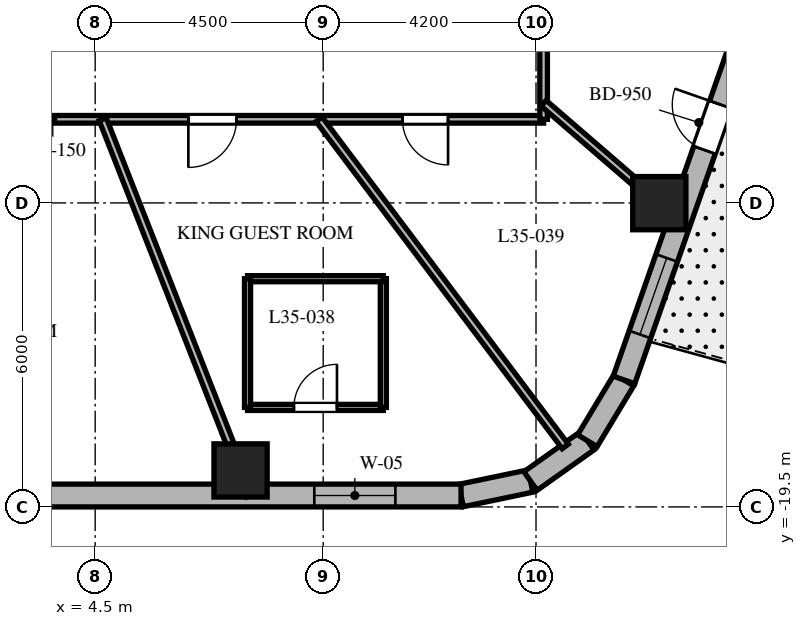
"""IFC4 building model, lengths in metres.
Left out: names, types, materials, properties, quantities, classifications, styles, units other than length and angle.
Written with IfcOpenShell. Run it as: python <this file> out.ifc"""

import sys

from ifc_helpers import new_model, si_unit, direction, frame, frame_2d, origin, origin_2d, place, context, subcontext, project, spatial, rectangle, extrude, element, fill, save


model = new_model("IFC4")
c1 = context("Model", 3, precision=1e-05, world=origin(), true_north=direction((0.0, 1.0)))
c2 = subcontext(c1, "Body", "Model", "MODEL_VIEW")
j1 = project(units=[si_unit("LENGTHUNIT", "METRE"), si_unit("PLANEANGLEUNIT", "RADIAN")], contexts=[c1])
p1 = place(None, origin())
s1 = spatial("IfcSite", under=j1, at=p1, CompositionType="ELEMENT")
p2 = place(p1, origin())
s2 = spatial("IfcBuilding", under=s1, at=p2, CompositionType="ELEMENT")
p3 = place(p2, frame((0.0, 0.0, 144.3)))
s3 = spatial("IfcBuildingStorey", under=s2, at=p3, CompositionType="ELEMENT", Elevation=144.3)
for number, where, z_axis, x_axis in (
    (1, (7.369, -18.78, 0.0), (0.0, 0.0, 1.0), (1.0, 0.0, 0.0)),
    (2, (15.633, -13.505, 0.0), (0.0, 0.0, 1.0), (1.0, 0.0, 0.0)),
):
    element("IfcColumn", number, at=place(p3, frame(where, z_axis=z_axis, x_axis=x_axis)), inside=s3, PredefinedType="COLUMN", context=c2, shape_type="SweptSolid", body=[
        extrude(rectangle(XDim=1.05, YDim=1.05, at=origin_2d()), origin(), (0.0, 0.0, 1.0), 3.7),
    ])
p4 = place(p3, frame((11.72, -19.275, 0.0), z_axis=(0.0, 0.0, 1.0), x_axis=(0.97893106758, 0.204191001093, 0.0)))
e3 = element("IfcWall", 3, at=p4, inside=s3, PredefinedType="SOLIDWALL", context=c2, shape_type="SweptSolid", body=[
    extrude(rectangle(XDim=1.4, YDim=0.45, at=frame_2d((0.7, 0.0))), origin(), (0.0, 0.0, 1.0), 3.4),
])
p5 = place(p3, frame((13.091, -18.989, 0.0), z_axis=(0.0, 0.0, 1.0), x_axis=(0.815574637848, 0.578651890258, 0.0)))
e4 = element("IfcWall", 4, at=p5, inside=s3, PredefinedType="SOLIDWALL", context=c2, shape_type="SweptSolid", body=[
    extrude(rectangle(XDim=1.377, YDim=0.45, at=frame_2d((0.688, 0.0))), origin(), (0.0, 0.0, 1.0), 3.4),
])
p6 = place(p3, frame((14.214, -18.192, 0.0), z_axis=(0.0, 0.0, 1.0), x_axis=(0.516340945502, 0.856383108193, 0.0)))
e5 = element("IfcWall", 5, at=p6, inside=s3, PredefinedType="SOLIDWALL", context=c2, shape_type="SweptSolid", body=[
    extrude(rectangle(XDim=1.4, YDim=0.45, at=frame_2d((0.7, 0.0))), origin(), (0.0, 0.0, 1.0), 3.4),
])
p7 = place(p3, frame((-10.108, -19.275, 0.0), z_axis=(0.0, 0.0, 1.0), x_axis=(1.0, 0.0, 0.0)))
e6 = element("IfcWall", 6, at=p7, inside=s3, PredefinedType="SOLIDWALL", context=c2, shape_type="SweptSolid", body=[
    extrude(rectangle(XDim=21.829, YDim=0.45, at=frame_2d((10.915, 0.0))), origin(), (0.0, 0.0, 1.0), 3.4),
])
p8 = place(p7, frame((1.297, 0.0, 0.8)))
e7 = element("IfcOpeningElement", 7, at=p8, cuts=e6, PredefinedType="OPENING", context=c2, shape_type="SweptSolid", body=[
    extrude(rectangle(XDim=1.6, YDim=1.75, at=frame_2d((0.8, 0.875))), frame((0.0, 0.235, 0.0), z_axis=(0.0, -1.0, 0.0), x_axis=(1.0, 0.0, 0.0)), (0.0, 0.0, 1.0), 0.47),
])
p9 = place(p7, frame((10.115, 0.0, 0.8)))
e8 = element("IfcOpeningElement", 8, at=p9, cuts=e6, PredefinedType="OPENING", context=c2, shape_type="SweptSolid", body=[
    extrude(rectangle(XDim=1.6, YDim=1.75, at=frame_2d((0.8, 0.875))), frame((0.0, 0.235, 0.0), z_axis=(0.0, -1.0, 0.0), x_axis=(1.0, 0.0, 0.0)), (0.0, 0.0, 1.0), 0.47),
])
p10 = place(p7, frame((18.933, 0.0, 0.8)))
e9 = element("IfcOpeningElement", 9, at=p10, cuts=e6, PredefinedType="OPENING", context=c2, shape_type="SweptSolid", body=[
    extrude(rectangle(XDim=1.6, YDim=1.75, at=frame_2d((0.8, 0.875))), frame((0.0, 0.235, 0.0), z_axis=(0.0, -1.0, 0.0), x_axis=(1.0, 0.0, 0.0)), (0.0, 0.0, 1.0), 0.47),
])
p11 = place(p3, frame((14.937, -16.993, 0.0), z_axis=(0.0, 0.0, 1.0), x_axis=(0.330431575061, 0.943829949834, 0.0)))
e10 = element("IfcWall", 10, at=p11, inside=s3, PredefinedType="SOLIDWALL", context=c2, shape_type="SweptSolid", body=[
    extrude(rectangle(XDim=17.689, YDim=0.45, at=frame_2d((8.844, 0.0))), origin(), (0.0, 0.0, 1.0), 3.4),
])
p12 = place(p11, frame((4.807, 0.0, 0.0)))
e11 = element("IfcOpeningElement", 11, at=p12, cuts=e10, PredefinedType="OPENING", context=c2, shape_type="SweptSolid", body=[
    extrude(rectangle(XDim=0.95, YDim=2.15, at=frame_2d((0.475, 1.075))), frame((0.0, 0.235, 0.0), z_axis=(0.0, -1.0, 0.0), x_axis=(1.0, 0.0, 0.0)), (0.0, 0.0, 1.0), 0.47),
])
p13 = place(p11, frame((0.95, 0.0, 0.8)))
e12 = element("IfcOpeningElement", 12, at=p13, cuts=e10, PredefinedType="OPENING", context=c2, shape_type="SweptSolid", body=[
    extrude(rectangle(XDim=1.6, YDim=1.75, at=frame_2d((0.8, 0.875))), frame((0.0, 0.235, 0.0), z_axis=(0.0, -1.0, 0.0), x_axis=(1.0, 0.0, 0.0)), (0.0, 0.0, 1.0), 0.47),
])
p14 = place(p11, frame((7.99, 0.0, 0.8)))
e13 = element("IfcOpeningElement", 13, at=p14, cuts=e10, PredefinedType="OPENING", context=c2, shape_type="SweptSolid", body=[
    extrude(rectangle(XDim=1.6, YDim=1.75, at=frame_2d((0.8, 0.875))), frame((0.0, 0.235, 0.0), z_axis=(0.0, -1.0, 0.0), x_axis=(1.0, 0.0, 0.0)), (0.0, 0.0, 1.0), 0.47),
])
p15 = place(p11, frame((15.084, 0.0, 0.8)))
e14 = element("IfcOpeningElement", 14, at=p15, cuts=e10, PredefinedType="OPENING", context=c2, shape_type="SweptSolid", body=[
    extrude(rectangle(XDim=1.6, YDim=1.75, at=frame_2d((0.8, 0.875))), frame((0.0, 0.235, 0.0), z_axis=(0.0, -1.0, 0.0), x_axis=(1.0, 0.0, 0.0)), (0.0, 0.0, 1.0), 0.47),
])
p16 = place(p3, frame((13.35, -11.85, 0.0), z_axis=(0.0, 0.0, 1.0), x_axis=(-1.0, 0.0, 0.0)))
e15 = element("IfcWall", 15, at=p16, inside=s3, PredefinedType="PARTITIONING", context=c2, shape_type="SweptSolid", body=[
    extrude(rectangle(XDim=26.7, YDim=0.15, at=frame_2d((13.35, 0.0))), origin(), (0.0, 0.0, 1.0), 2.84),
])
p17 = place(p16, frame((22.7, 0.0, 0.0)))
e16 = element("IfcOpeningElement", 16, at=p17, cuts=e15, PredefinedType="OPENING", context=c2, shape_type="SweptSolid", body=[
    extrude(rectangle(XDim=0.9, YDim=2.03, at=frame_2d((0.45, 1.015))), frame((0.0, 0.085, 0.0), z_axis=(0.0, -1.0, 0.0), x_axis=(1.0, 0.0, 0.0)), (0.0, 0.0, 1.0), 0.17),
])
p18 = place(p16, frame((18.523, 0.0, 0.0)))
e17 = element("IfcOpeningElement", 17, at=p18, cuts=e15, PredefinedType="OPENING", context=c2, shape_type="SweptSolid", body=[
    extrude(rectangle(XDim=0.95, YDim=2.03, at=frame_2d((0.475, 1.015))), frame((0.0, 0.085, 0.0), z_axis=(0.0, -1.0, 0.0), x_axis=(1.0, 0.0, 0.0)), (0.0, 0.0, 1.0), 0.17),
])
p19 = place(p16, frame((12.362, 0.0, 0.0)))
e18 = element("IfcOpeningElement", 18, at=p19, cuts=e15, PredefinedType="OPENING", context=c2, shape_type="SweptSolid", body=[
    extrude(rectangle(XDim=0.95, YDim=2.03, at=frame_2d((0.475, 1.015))), frame((0.0, 0.085, 0.0), z_axis=(0.0, -1.0, 0.0), x_axis=(1.0, 0.0, 0.0)), (0.0, 0.0, 1.0), 0.17),
])
p20 = place(p16, frame((6.061, 0.0, 0.0)))
e19 = element("IfcOpeningElement", 19, at=p20, cuts=e15, PredefinedType="OPENING", context=c2, shape_type="SweptSolid", body=[
    extrude(rectangle(XDim=0.95, YDim=2.03, at=frame_2d((0.475, 1.015))), frame((0.0, 0.085, 0.0), z_axis=(0.0, -1.0, 0.0), x_axis=(1.0, 0.0, 0.0)), (0.0, 0.0, 1.0), 0.17),
])
p21 = place(p16, frame((1.886, 0.0, 0.0)))
e20 = element("IfcOpeningElement", 20, at=p21, cuts=e15, PredefinedType="OPENING", context=c2, shape_type="SweptSolid", body=[
    extrude(rectangle(XDim=0.9, YDim=2.03, at=frame_2d((0.45, 1.015))), frame((0.0, 0.085, 0.0), z_axis=(0.0, -1.0, 0.0), x_axis=(1.0, 0.0, 0.0)), (0.0, 0.0, 1.0), 0.17),
])
p22 = place(p3, frame((13.35, 11.85, 0.0), z_axis=(0.0, 0.0, 1.0), x_axis=(0.0, -1.0, 0.0)))
e21 = element("IfcWall", 21, at=p22, inside=s3, PredefinedType="PARTITIONING", context=c2, shape_type="SweptSolid", body=[
    extrude(rectangle(XDim=23.7, YDim=0.15, at=frame_2d((11.85, 0.0))), origin(), (0.0, 0.0, 1.0), 2.84),
])
p23 = place(p22, frame((9.27, 0.0, 0.0)))
e22 = element("IfcOpeningElement", 22, at=p23, cuts=e21, PredefinedType="OPENING", context=c2, shape_type="SweptSolid", body=[
    extrude(rectangle(XDim=0.9, YDim=2.03, at=frame_2d((0.45, 1.015))), frame((0.0, 0.085, 0.0), z_axis=(0.0, -1.0, 0.0), x_axis=(1.0, 0.0, 0.0)), (0.0, 0.0, 1.0), 0.17),
])
p24 = place(p22, frame((5.393, 0.0, 0.0)))
e23 = element("IfcOpeningElement", 23, at=p24, cuts=e21, PredefinedType="OPENING", context=c2, shape_type="SweptSolid", body=[
    extrude(rectangle(XDim=0.9, YDim=2.03, at=frame_2d((0.45, 1.015))), frame((0.0, 0.085, 0.0), z_axis=(0.0, -1.0, 0.0), x_axis=(1.0, 0.0, 0.0)), (0.0, 0.0, 1.0), 0.17),
])
p25 = place(p22, frame((1.439, 0.0, 0.0)))
e24 = element("IfcOpeningElement", 24, at=p25, cuts=e21, PredefinedType="OPENING", context=c2, shape_type="SweptSolid", body=[
    extrude(rectangle(XDim=0.9, YDim=2.03, at=frame_2d((0.45, 1.015))), frame((0.0, 0.085, 0.0), z_axis=(0.0, -1.0, 0.0), x_axis=(1.0, 0.0, 0.0)), (0.0, 0.0, 1.0), 0.17),
])
p26 = place(p22, frame((18.389, 0.0, 0.0)))
e25 = element("IfcOpeningElement", 25, at=p26, cuts=e21, PredefinedType="OPENING", context=c2, shape_type="SweptSolid", body=[
    extrude(rectangle(XDim=0.95, YDim=2.03, at=frame_2d((0.475, 1.015))), frame((0.0, 0.085, 0.0), z_axis=(0.0, -1.0, 0.0), x_axis=(1.0, 0.0, 0.0)), (0.0, 0.0, 1.0), 0.17),
])
p27 = place(p22, frame((12.315, 0.0, 0.0)))
e26 = element("IfcOpeningElement", 26, at=p27, cuts=e21, PredefinedType="OPENING", context=c2, shape_type="SweptSolid", body=[
    extrude(rectangle(XDim=0.9, YDim=2.03, at=frame_2d((0.45, 1.015))), frame((0.0, 0.085, 0.0), z_axis=(0.0, -1.0, 0.0), x_axis=(1.0, 0.0, 0.0)), (0.0, 0.0, 1.0), 0.17),
])
p28 = place(p3, frame((4.65, -11.85, 0.0), z_axis=(0.0, 0.0, 1.0), x_axis=(0.365265947993, -0.930903210456, 0.0)))
e27 = element("IfcWall", 27, at=p28, inside=s3, PredefinedType="PARTITIONING", context=c2, shape_type="SweptSolid", body=[
    extrude(rectangle(XDim=7.976, YDim=0.15, at=frame_2d((3.988, 0.0))), origin(), (0.0, 0.0, 1.0), 2.64),
])
p29 = place(p3, frame((8.918, -11.85, 0.0), z_axis=(0.0, 0.0, 1.0), x_axis=(0.601347965064, -0.798987249531, 0.0)))
e28 = element("IfcWall", 28, at=p29, inside=s3, PredefinedType="PARTITIONING", context=c2, shape_type="SweptSolid", body=[
    extrude(rectangle(XDim=8.08, YDim=0.15, at=frame_2d((4.04, 0.0))), origin(), (0.0, 0.0, 1.0), 2.64),
])
p30 = place(p3, frame((13.35, -11.533, 0.0), z_axis=(0.0, 0.0, 1.0), x_axis=(0.756711647314, -0.65374879183, 0.0)))
e29 = element("IfcWall", 29, at=p30, inside=s3, PredefinedType="PARTITIONING", context=c2, shape_type="SweptSolid", body=[
    extrude(rectangle(XDim=3.55, YDim=0.15, at=frame_2d((1.775, 0.0))), origin(), (0.0, 0.0, 1.0), 2.64),
])
p31 = place(p3, frame((7.507, -17.536, 0.0), z_axis=(0.0, 0.0, 1.0), x_axis=(1.0, 0.0, 0.0)))
e30 = element("IfcWall", 30, at=p31, inside=s3, PredefinedType="PARTITIONING", context=c2, shape_type="SweptSolid", body=[
    extrude(rectangle(XDim=2.68, YDim=0.12, at=frame_2d((1.34, 0.0))), origin(), (0.0, 0.0, 1.0), 2.64),
])
p32 = place(p31, frame((0.915, 0.0, 0.0)))
e31 = element("IfcOpeningElement", 31, at=p32, cuts=e30, PredefinedType="OPENING", context=c2, shape_type="SweptSolid", body=[
    extrude(rectangle(XDim=0.85, YDim=2.03, at=frame_2d((0.425, 1.015))), frame((0.0, 0.07, 0.0), z_axis=(0.0, -1.0, 0.0), x_axis=(1.0, 0.0, 0.0)), (0.0, 0.0, 1.0), 0.14),
])
p33 = place(p3, frame((10.187, -17.536, 0.0), z_axis=(0.0, 0.0, 1.0), x_axis=(0.0, 1.0, 0.0)))
e32 = element("IfcWall", 32, at=p33, inside=s3, PredefinedType="PARTITIONING", context=c2, shape_type="SweptSolid", body=[
    extrude(rectangle(XDim=2.54, YDim=0.12, at=frame_2d((1.27, 0.0))), origin(), (0.0, 0.0, 1.0), 2.64),
])
p34 = place(p3, frame((10.187, -14.996, 0.0), z_axis=(0.0, 0.0, 1.0), x_axis=(-1.0, 0.0, 0.0)))
e33 = element("IfcWall", 33, at=p34, inside=s3, PredefinedType="PARTITIONING", context=c2, shape_type="SweptSolid", body=[
    extrude(rectangle(XDim=2.68, YDim=0.12, at=frame_2d((1.34, 0.0))), origin(), (0.0, 0.0, 1.0), 2.84),
])
p35 = place(p3, frame((7.507, -14.996, 0.0), z_axis=(0.0, 0.0, 1.0), x_axis=(0.0, -1.0, 0.0)))
e34 = element("IfcWall", 34, at=p35, inside=s3, PredefinedType="PARTITIONING", context=c2, shape_type="SweptSolid", body=[
    extrude(rectangle(XDim=2.54, YDim=0.12, at=frame_2d((1.27, 0.0))), origin(), (0.0, 0.0, 1.0), 2.84),
])
p36 = place(p10, origin())
e35 = element("IfcWindow", 35, at=p36, inside=s3, PartitioningType="SINGLE_PANEL", PredefinedType="WINDOW", context=c2, shape_type="SweptSolid", body=[
    extrude(rectangle(XDim=1.6, YDim=1.75, at=frame_2d((0.8, 0.875))), frame((0.0, 0.03, 0.0), z_axis=(0.0, -1.0, 0.0), x_axis=(1.0, 0.0, 0.0)), (0.0, 0.0, 1.0), 0.06),
])
fill(e9, e35)
p37 = place(p12, origin())
e36 = element("IfcDoor", 36, at=p37, inside=s3, OperationType="SINGLE_SWING_RIGHT", PredefinedType="DOOR", context=c2, shape_type="SweptSolid", body=[
    extrude(rectangle(XDim=0.95, YDim=2.15, at=frame_2d((0.475, 1.075))), frame((0.0, 0.025, 0.0), z_axis=(0.0, -1.0, 0.0), x_axis=(1.0, 0.0, 0.0)), (0.0, 0.0, 1.0), 0.05),
])
fill(e11, e36)
p38 = place(p13, origin())
e37 = element("IfcWindow", 37, at=p38, inside=s3, PartitioningType="SINGLE_PANEL", PredefinedType="WINDOW", context=c2, shape_type="SweptSolid", body=[
    extrude(rectangle(XDim=1.6, YDim=1.75, at=frame_2d((0.8, 0.875))), frame((0.0, 0.03, 0.0), z_axis=(0.0, -1.0, 0.0), x_axis=(1.0, 0.0, 0.0)), (0.0, 0.0, 1.0), 0.06),
])
fill(e12, e37)
p39 = place(p20, origin())
e38 = element("IfcDoor", 38, at=p39, inside=s3, OperationType="SINGLE_SWING_RIGHT", PredefinedType="DOOR", context=c2, shape_type="SweptSolid", body=[
    extrude(rectangle(XDim=0.95, YDim=2.03, at=frame_2d((0.475, 1.015))), frame((0.0, 0.025, 0.0), z_axis=(0.0, -1.0, 0.0), x_axis=(1.0, 0.0, 0.0)), (0.0, 0.0, 1.0), 0.05),
])
fill(e19, e38)
p40 = place(p32, origin())
e39 = element("IfcDoor", 39, at=p40, inside=s3, OperationType="SINGLE_SWING_RIGHT", PredefinedType="DOOR", context=c2, shape_type="SweptSolid", body=[
    extrude(rectangle(XDim=0.85, YDim=2.03, at=frame_2d((0.425, 1.015))), frame((0.0, 0.025, 0.0), z_axis=(0.0, -1.0, 0.0), x_axis=(1.0, 0.0, 0.0)), (0.0, 0.0, 1.0), 0.05),
])
fill(e31, e39)
p41 = place(p21, origin())
e40 = element("IfcDoor", 40, at=p41, inside=s3, OperationType="SINGLE_SWING_LEFT", PredefinedType="DOOR", context=c2, shape_type="SweptSolid", body=[
    extrude(rectangle(XDim=0.9, YDim=2.03, at=frame_2d((0.45, 1.015))), frame((0.0, 0.025, 0.0), z_axis=(0.0, -1.0, 0.0), x_axis=(1.0, 0.0, 0.0)), (0.0, 0.0, 1.0), 0.05),
])
fill(e20, e40)
save(model, sys.argv[1])
